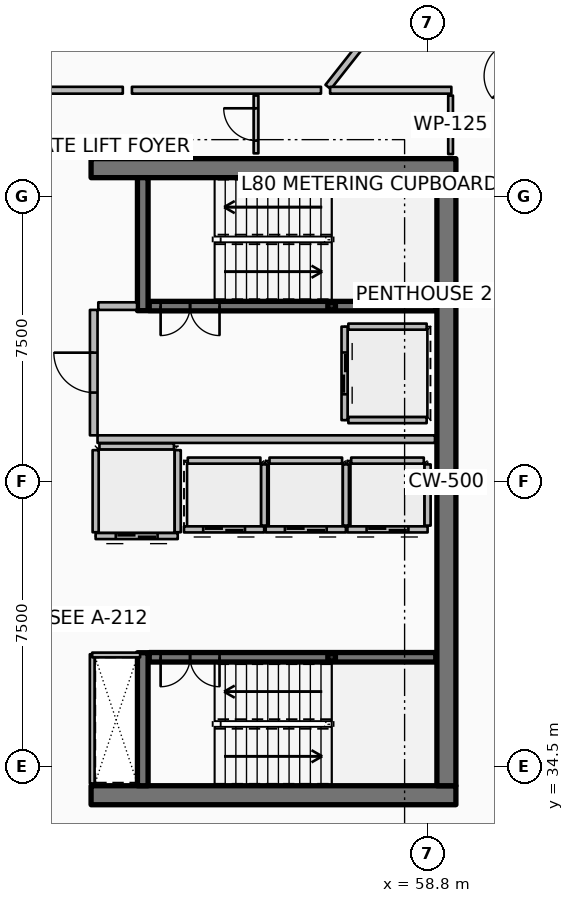
"""IFC4 building model, lengths in metres.
Left out: names, types, materials, properties, quantities, classifications, styles, units other than length and angle.
Written with IfcOpenShell. Run it as: python <this file> out.ifc"""

import sys

from ifc_helpers import new_model, si_unit, direction, frame, frame_2d, origin, origin_2d, place, context, subcontext, project, spatial, rectangle, hollow_rectangle, extrude, element, fill, save


model = new_model("IFC4")
c1 = context("Model", 3, precision=1e-05, world=origin(), true_north=direction((0.0, 1.0)))
c2 = subcontext(c1, "Body", "Model", "MODEL_VIEW")
j1 = project(units=[si_unit("LENGTHUNIT", "METRE"), si_unit("PLANEANGLEUNIT", "RADIAN")], contexts=[c1])
p1 = place(None, origin())
s1 = spatial("IfcSite", under=j1, at=p1, CompositionType="ELEMENT")
p2 = place(p1, origin())
s2 = spatial("IfcBuilding", under=s1, at=p2, CompositionType="ELEMENT")
p3 = place(p2, frame((0.0, 0.0, 317.9)))
s3 = spatial("IfcBuildingStorey", under=s2, at=p3, CompositionType="ELEMENT", Elevation=317.9)
for number, where, z_axis, x_axis in (
    (1, (49.95, 33.75, 0.0), (0.0, 0.0, 1.0), (1.0, 0.0, 0.0)),
    (2, (49.95, 50.25, 0.0), (0.0, 0.0, 1.0), (1.0, 0.0, 0.0)),
):
    element("IfcWall", number, at=place(p3, frame(where, z_axis=z_axis, x_axis=x_axis)), inside=s3, PredefinedType="SHEAR", context=c2, shape_type="SweptSolid", body=[
        extrude(rectangle(XDim=9.6, YDim=0.5, at=frame_2d((4.8, 0.0))), origin(), (0.0, 0.0, 1.0), 4.2),
    ])
p4 = place(p3, frame((59.3, 34.0, 0.0), z_axis=(0.0, 0.0, 1.0), x_axis=(0.0, 1.0, 0.0)))
e3 = element("IfcWall", 3, at=p4, inside=s3, PredefinedType="SHEAR", context=c2, shape_type="SweptSolid", body=[
    extrude(rectangle(XDim=16.0, YDim=0.5, at=frame_2d((8.0, 0.0))), origin(), (0.0, 0.0, 1.0), 4.2),
])
for number, where, z_axis, x_axis in (
    (4, (51.31, 46.5, 0.0), (0.0, 0.0, 1.0), (0.0, 1.0, 0.0)),
    (5, (51.31, 34.0, 0.0), (0.0, 0.0, 1.0), (0.0, 1.0, 0.0)),
):
    element("IfcWall", number, at=place(p3, frame(where, z_axis=z_axis, x_axis=x_axis)), inside=s3, PredefinedType="SHEAR", context=c2, shape_type="SweptSolid", body=[
        extrude(rectangle(XDim=3.5, YDim=0.28, at=frame_2d((1.75, 0.0))), origin(), (0.0, 0.0, 1.0), 4.2),
    ])
for number, where, z_axis, x_axis in (
    (6, (56.28, 46.62, 0.0), (0.0, 0.0, 1.0), (1.0, 0.0, 0.0)),
    (7, (56.28, 37.38, 0.0), (0.0, 0.0, 1.0), (1.0, 0.0, 0.0)),
):
    element("IfcColumn", number, at=place(p3, frame(where, z_axis=z_axis, x_axis=x_axis)), inside=s3, PredefinedType="COLUMN", context=c2, shape_type="SweptSolid", body=[
        extrude(hollow_rectangle(XDim=0.2, YDim=0.2, WallThickness=0.01, InnerFilletRadius=0.01, OuterFilletRadius=0.02, at=origin_2d()), origin(), (0.0, 0.0, 1.0), 1.895),
    ])
p5 = place(p3, frame((51.48, 46.62, 0.0), z_axis=(0.0, 0.0, 1.0), x_axis=(1.0, 0.0, 0.0)))
e8 = element("IfcWall", 8, at=p5, inside=s3, PredefinedType="SOLIDWALL", context=c2, shape_type="SweptSolid", body=[
    extrude(rectangle(XDim=7.54, YDim=0.25, at=frame_2d((3.77, 0.0))), origin(), (0.0, 0.0, 1.0), 3.94),
])
p6 = place(p5, frame((0.3, 0.0, 0.0)))
e9 = element("IfcOpeningElement", 9, at=p6, cuts=e8, PredefinedType="OPENING", context=c2, shape_type="SweptSolid", body=[
    extrude(rectangle(XDim=1.55, YDim=2.15, at=frame_2d((0.775, 1.075))), frame((0.0, 0.135, 0.0), z_axis=(0.0, -1.0, 0.0), x_axis=(1.0, 0.0, 0.0)), (0.0, 0.0, 1.0), 0.27),
])
p7 = place(p3, frame((51.48, 37.38, 0.0), z_axis=(0.0, 0.0, 1.0), x_axis=(1.0, 0.0, 0.0)))
e10 = element("IfcWall", 10, at=p7, inside=s3, PredefinedType="SOLIDWALL", context=c2, shape_type="SweptSolid", body=[
    extrude(rectangle(XDim=7.54, YDim=0.25, at=frame_2d((3.77, 0.0))), origin(), (0.0, 0.0, 1.0), 3.94),
])
p8 = place(p7, frame((0.3, 0.0, 0.0)))
e11 = element("IfcOpeningElement", 11, at=p8, cuts=e10, PredefinedType="OPENING", context=c2, shape_type="SweptSolid", body=[
    extrude(rectangle(XDim=1.55, YDim=2.15, at=frame_2d((0.775, 1.075))), frame((0.0, 0.135, 0.0), z_axis=(0.0, -1.0, 0.0), x_axis=(1.0, 0.0, 0.0)), (0.0, 0.0, 1.0), 0.27),
])
p9 = place(p3, frame((54.505, 40.745, 0.0), z_axis=(0.0, 0.0, 1.0), x_axis=(-1.0, 0.0, 0.0)))
e12 = element("IfcWall", 12, at=p9, inside=s3, PredefinedType="PARTITIONING", context=c2, shape_type="SweptSolid", body=[
    extrude(rectangle(XDim=2.11, YDim=0.16, at=frame_2d((1.055, 0.0))), origin(), (0.0, 0.0, 1.0), 3.94),
])
p10 = place(p9, frame((0.505, 0.0, 0.0)))
e13 = element("IfcOpeningElement", 13, at=p10, cuts=e12, PredefinedType="OPENING", context=c2, shape_type="SweptSolid", body=[
    extrude(rectangle(XDim=1.1, YDim=2.1, at=frame_2d((0.55, 1.05))), frame((0.0, 0.09, 0.0), z_axis=(0.0, -1.0, 0.0), x_axis=(1.0, 0.0, 0.0)), (0.0, 0.0, 1.0), 0.18),
])
p11 = place(p3, frame((54.505, 40.845, 0.0), z_axis=(0.0, 0.0, 1.0), x_axis=(0.0, 1.0, 0.0)))
e14 = element("IfcWall", 14, at=p11, inside=s3, PredefinedType="PARTITIONING", context=c2, shape_type="SweptSolid", body=[
    extrude(rectangle(XDim=1.61, YDim=0.16, at=frame_2d((0.805, 0.0))), origin(), (0.0, 0.0, 1.0), 3.94),
])
p12 = place(p3, frame((52.495, 42.555, 0.0), z_axis=(0.0, 0.0, 1.0), x_axis=(1.0, 0.0, 0.0)))
e15 = element("IfcWall", 15, at=p12, inside=s3, PredefinedType="PARTITIONING", context=c2, shape_type="SweptSolid", body=[
    extrude(rectangle(XDim=1.91, YDim=0.16, at=frame_2d((0.955, 0.0))), origin(), (0.0, 0.0, 1.0), 3.94),
])
p13 = place(p3, frame((56.655, 40.745, 0.0), z_axis=(0.0, 0.0, 1.0), x_axis=(-1.0, 0.0, 0.0)))
e16 = element("IfcWall", 16, at=p13, inside=s3, PredefinedType="PARTITIONING", context=c2, shape_type="SweptSolid", body=[
    extrude(rectangle(XDim=2.11, YDim=0.16, at=frame_2d((1.055, 0.0))), origin(), (0.0, 0.0, 1.0), 3.94),
])
p14 = place(p13, frame((0.505, 0.0, 0.0)))
e17 = element("IfcOpeningElement", 17, at=p14, cuts=e16, PredefinedType="OPENING", context=c2, shape_type="SweptSolid", body=[
    extrude(rectangle(XDim=1.1, YDim=2.1, at=frame_2d((0.55, 1.05))), frame((0.0, 0.09, 0.0), z_axis=(0.0, -1.0, 0.0), x_axis=(1.0, 0.0, 0.0)), (0.0, 0.0, 1.0), 0.18),
])
p15 = place(p3, frame((56.655, 40.845, 0.0), z_axis=(0.0, 0.0, 1.0), x_axis=(0.0, 1.0, 0.0)))
e18 = element("IfcWall", 18, at=p15, inside=s3, PredefinedType="PARTITIONING", context=c2, shape_type="SweptSolid", body=[
    extrude(rectangle(XDim=1.61, YDim=0.16, at=frame_2d((0.805, 0.0))), origin(), (0.0, 0.0, 1.0), 3.94),
])
p16 = place(p3, frame((54.645, 42.555, 0.0), z_axis=(0.0, 0.0, 1.0), x_axis=(1.0, 0.0, 0.0)))
e19 = element("IfcWall", 19, at=p16, inside=s3, PredefinedType="PARTITIONING", context=c2, shape_type="SweptSolid", body=[
    extrude(rectangle(XDim=1.91, YDim=0.16, at=frame_2d((0.955, 0.0))), origin(), (0.0, 0.0, 1.0), 3.94),
])
p17 = place(p3, frame((58.805, 40.745, 0.0), z_axis=(0.0, 0.0, 1.0), x_axis=(-1.0, 0.0, 0.0)))
e20 = element("IfcWall", 20, at=p17, inside=s3, PredefinedType="PARTITIONING", context=c2, shape_type="SweptSolid", body=[
    extrude(rectangle(XDim=2.11, YDim=0.16, at=frame_2d((1.055, 0.0))), origin(), (0.0, 0.0, 1.0), 3.94),
])
p18 = place(p17, frame((0.505, 0.0, 0.0)))
e21 = element("IfcOpeningElement", 21, at=p18, cuts=e20, PredefinedType="OPENING", context=c2, shape_type="SweptSolid", body=[
    extrude(rectangle(XDim=1.1, YDim=2.1, at=frame_2d((0.55, 1.05))), frame((0.0, 0.09, 0.0), z_axis=(0.0, -1.0, 0.0), x_axis=(1.0, 0.0, 0.0)), (0.0, 0.0, 1.0), 0.18),
])
p19 = place(p3, frame((58.805, 40.845, 0.0), z_axis=(0.0, 0.0, 1.0), x_axis=(0.0, 1.0, 0.0)))
e22 = element("IfcWall", 22, at=p19, inside=s3, PredefinedType="PARTITIONING", context=c2, shape_type="SweptSolid", body=[
    extrude(rectangle(XDim=1.61, YDim=0.16, at=frame_2d((0.805, 0.0))), origin(), (0.0, 0.0, 1.0), 3.94),
])
p20 = place(p3, frame((56.795, 42.555, 0.0), z_axis=(0.0, 0.0, 1.0), x_axis=(1.0, 0.0, 0.0)))
e23 = element("IfcWall", 23, at=p20, inside=s3, PredefinedType="PARTITIONING", context=c2, shape_type="SweptSolid", body=[
    extrude(rectangle(XDim=1.91, YDim=0.16, at=frame_2d((0.955, 0.0))), origin(), (0.0, 0.0, 1.0), 3.94),
])
p21 = place(p3, frame((56.62, 46.08, 0.0), z_axis=(0.0, 0.0, 1.0), x_axis=(0.0, -1.0, 0.0)))
e24 = element("IfcWall", 24, at=p21, inside=s3, PredefinedType="PARTITIONING", context=c2, shape_type="SweptSolid", body=[
    extrude(rectangle(XDim=2.46, YDim=0.16, at=frame_2d((1.23, 0.0))), origin(), (0.0, 0.0, 1.0), 3.94),
])
p22 = place(p21, frame((0.68, 0.0, 0.0)))
e25 = element("IfcOpeningElement", 25, at=p22, cuts=e24, PredefinedType="OPENING", context=c2, shape_type="SweptSolid", body=[
    extrude(rectangle(XDim=1.1, YDim=2.1, at=frame_2d((0.55, 1.05))), frame((0.0, 0.09, 0.0), z_axis=(0.0, -1.0, 0.0), x_axis=(1.0, 0.0, 0.0)), (0.0, 0.0, 1.0), 0.18),
])
for number, where, z_axis, x_axis in (
    (26, (56.72, 46.08, 0.0), (0.0, 0.0, 1.0), (1.0, 0.0, 0.0)),
    (27, (56.72, 43.62, 0.0), (0.0, 0.0, 1.0), (1.0, 0.0, 0.0)),
):
    element("IfcWall", number, at=place(p3, frame(where, z_axis=z_axis, x_axis=x_axis)), inside=s3, PredefinedType="PARTITIONING", context=c2, shape_type="SweptSolid", body=[
        extrude(rectangle(XDim=2.06, YDim=0.16, at=frame_2d((1.03, 0.0))), origin(), (0.0, 0.0, 1.0), 3.94),
    ])
p23 = place(p3, frame((52.23, 40.57, 0.0), z_axis=(0.0, 0.0, 1.0), x_axis=(-1.0, 0.0, 0.0)))
e28 = element("IfcWall", 28, at=p23, inside=s3, PredefinedType="PARTITIONING", context=c2, shape_type="SweptSolid", body=[
    extrude(rectangle(XDim=2.16, YDim=0.16, at=frame_2d((1.08, 0.0))), origin(), (0.0, 0.0, 1.0), 3.94),
])
p24 = place(p23, frame((0.53, 0.0, 0.0)))
e29 = element("IfcOpeningElement", 29, at=p24, cuts=e28, PredefinedType="OPENING", context=c2, shape_type="SweptSolid", body=[
    extrude(rectangle(XDim=1.1, YDim=2.1, at=frame_2d((0.55, 1.05))), frame((0.0, 0.09, 0.0), z_axis=(0.0, -1.0, 0.0), x_axis=(1.0, 0.0, 0.0)), (0.0, 0.0, 1.0), 0.18),
])
for number, where, z_axis, x_axis in (
    (30, (52.23, 40.67, 0.0), (0.0, 0.0, 1.0), (0.0, 1.0, 0.0)),
    (31, (50.07, 40.67, 0.0), (0.0, 0.0, 1.0), (0.0, 1.0, 0.0)),
):
    element("IfcWall", number, at=place(p3, frame(where, z_axis=z_axis, x_axis=x_axis)), inside=s3, PredefinedType="PARTITIONING", context=c2, shape_type="SweptSolid", body=[
        extrude(rectangle(XDim=2.16, YDim=0.16, at=frame_2d((1.08, 0.0))), origin(), (0.0, 0.0, 1.0), 3.94),
    ])
p25 = place(p3, frame((50.17, 42.93, 0.0), z_axis=(0.0, 0.0, 1.0), x_axis=(1.0, 0.0, 0.0)))
e32 = element("IfcWall", 32, at=p25, inside=s3, PredefinedType="PARTITIONING", context=c2, shape_type="SweptSolid", body=[
    extrude(rectangle(XDim=1.96, YDim=0.16, at=frame_2d((0.98, 0.0))), origin(), (0.0, 0.0, 1.0), 3.94),
])
p26 = place(p3, frame((50.12, 43.12, 0.0), z_axis=(0.0, 0.0, 1.0), x_axis=(1.0, 0.0, 0.0)))
e33 = element("IfcWall", 33, at=p26, inside=s3, PredefinedType="PARTITIONING", context=c2, shape_type="SweptSolid", body=[
    extrude(rectangle(XDim=8.88, YDim=0.2, at=frame_2d((4.44, 0.0))), origin(), (0.0, 0.0, 1.0), 3.94),
])
p27 = place(p3, frame((50.14, 46.62, 0.0), z_axis=(0.0, 0.0, 1.0), x_axis=(1.0, 0.0, 0.0)))
e34 = element("IfcWall", 34, at=p27, inside=s3, PredefinedType="PARTITIONING", context=c2, shape_type="SweptSolid", body=[
    extrude(rectangle(XDim=1.02, YDim=0.2, at=frame_2d((0.51, 0.0))), origin(), (0.0, 0.0, 1.0), 3.94),
])
p28 = place(p3, frame((50.02, 43.22, 0.0), z_axis=(0.0, 0.0, 1.0), x_axis=(0.0, 1.0, 0.0)))
e35 = element("IfcWall", 35, at=p28, inside=s3, PredefinedType="PARTITIONING", context=c2, shape_type="SweptSolid", body=[
    extrude(rectangle(XDim=3.3, YDim=0.2, at=frame_2d((1.65, 0.0))), origin(), (0.0, 0.0, 1.0), 3.94),
])
p29 = place(p28, frame((1.125, 0.0, 0.0)))
e36 = element("IfcOpeningElement", 36, at=p29, cuts=e35, PredefinedType="OPENING", context=c2, shape_type="SweptSolid", body=[
    extrude(rectangle(XDim=1.05, YDim=2.1, at=frame_2d((0.525, 1.05))), frame((0.0, 0.11, 0.0), z_axis=(0.0, -1.0, 0.0), x_axis=(1.0, 0.0, 0.0)), (0.0, 0.0, 1.0), 0.22),
])
p30 = place(p3, frame((49.98, 34.06, 0.0), z_axis=(0.0, 0.0, 1.0), x_axis=(0.0, 1.0, 0.0)))
e37 = element("IfcWall", 37, at=p30, inside=s3, PredefinedType="PARTITIONING", context=c2, shape_type="SweptSolid", body=[
    extrude(rectangle(XDim=3.4, YDim=0.125, at=frame_2d((1.7, 0.0))), origin(), (0.0, 0.0, 1.0), 3.38),
])
p31 = place(p3, frame((49.98, 37.44, 0.0), z_axis=(0.0, 0.0, 1.0), x_axis=(1.0, 0.0, 0.0)))
e38 = element("IfcWall", 38, at=p31, inside=s3, PredefinedType="PARTITIONING", context=c2, shape_type="SweptSolid", body=[
    extrude(rectangle(XDim=1.26, YDim=0.125, at=frame_2d((0.63, 0.0))), origin(), (0.0, 0.0, 1.0), 3.38),
])
p32 = place(p3, frame((59.41, 50.62, 0.0), z_axis=(0.0, 0.0, 1.0), x_axis=(0.0, 1.0, 0.0)))
e39 = element("IfcWall", 39, at=p32, inside=s3, PredefinedType="PARTITIONING", context=c2, shape_type="SweptSolid", body=[
    extrude(rectangle(XDim=1.54, YDim=0.125, at=frame_2d((0.77, 0.0))), origin(), (0.0, 0.0, 1.0), 3.38),
])
p33 = place(p3, frame((54.29, 50.64, 0.0), z_axis=(0.0, 0.0, 1.0), x_axis=(0.0, 1.0, 0.0)))
e40 = element("IfcWall", 40, at=p33, inside=s3, PredefinedType="PARTITIONING", context=c2, shape_type="SweptSolid", body=[
    extrude(rectangle(XDim=1.52, YDim=0.125, at=frame_2d((0.76, 0.0))), origin(), (0.0, 0.0, 1.0), 3.38),
])
p34 = place(p33, frame((0.335, 0.0, 0.0)))
e41 = element("IfcOpeningElement", 41, at=p34, cuts=e40, PredefinedType="OPENING", context=c2, shape_type="SweptSolid", body=[
    extrude(rectangle(XDim=0.85, YDim=2.06, at=frame_2d((0.425, 1.03))), frame((0.0, 0.073, 0.0), z_axis=(0.0, -1.0, 0.0), x_axis=(1.0, 0.0, 0.0)), (0.0, 0.0, 1.0), 0.145),
])
p35 = place(p3, frame((56.188, 52.386, 0.0), z_axis=(0.0, 0.0, 1.0), x_axis=(0.619092742501, 0.78531788225, 0.0)))
e42 = element("IfcWall", 42, at=p35, inside=s3, PredefinedType="PARTITIONING", context=c2, shape_type="SweptSolid", body=[
    extrude(rectangle(XDim=11.901, YDim=0.18, at=frame_2d((5.951, 0.0))), origin(), (0.0, 0.0, 1.0), 3.38),
])
p36 = place(p3, frame((56.0, 52.3, 0.0), z_axis=(0.0, 0.0, 1.0), x_axis=(-1.0, 0.0, 0.0)))
e43 = element("IfcWall", 43, at=p36, inside=s3, PredefinedType="PARTITIONING", context=c2, shape_type="SweptSolid", body=[
    extrude(rectangle(XDim=4.975, YDim=0.18, at=frame_2d((2.488, 0.0))), origin(), (0.0, 0.0, 1.0), 3.38),
])
p37 = place(p3, frame((50.785, 52.3, 0.0), z_axis=(0.0, 0.0, 1.0), x_axis=(-1.0, 0.0, 0.0)))
e44 = element("IfcWall", 44, at=p37, inside=s3, PredefinedType="PARTITIONING", context=c2, shape_type="SweptSolid", body=[
    extrude(rectangle(XDim=3.884, YDim=0.18, at=frame_2d((1.942, 0.0))), origin(), (0.0, 0.0, 1.0), 3.38),
])
p38 = place(p3, frame((59.43, 52.3, 0.0), z_axis=(0.0, 0.0, 1.0), x_axis=(-1.0, 0.0, 0.0)))
e45 = element("IfcWall", 45, at=p38, inside=s3, PredefinedType="PARTITIONING", context=c2, shape_type="SweptSolid", body=[
    extrude(rectangle(XDim=3.19, YDim=0.18, at=frame_2d((1.595, 0.0))), origin(), (0.0, 0.0, 1.0), 3.38),
])
p39 = place(p3, frame((63.019, 50.535, 0.0), z_axis=(0.0, 0.0, 1.0), x_axis=(-0.649450715324, 0.760403687764, 0.0)))
e46 = element("IfcWall", 46, at=p39, inside=s3, PredefinedType="PARTITIONING", context=c2, shape_type="SweptSolid", body=[
    extrude(rectangle(XDim=6.529, YDim=0.125, at=frame_2d((3.264, 0.0))), origin(), (0.0, 0.0, 1.0), 3.38),
])
p40 = place(p39, frame((2.814, 0.0, 0.0)))
e47 = element("IfcOpeningElement", 47, at=p40, cuts=e46, PredefinedType="OPENING", context=c2, shape_type="SweptSolid", body=[
    extrude(rectangle(XDim=0.9, YDim=2.08, at=frame_2d((0.45, 1.04))), frame((0.0, 0.073, 0.0), z_axis=(0.0, -1.0, 0.0), x_axis=(1.0, 0.0, 0.0)), (0.0, 0.0, 1.0), 0.145),
])
p41 = place(p3, frame((65.467, 51.906, 0.0), z_axis=(0.0, 0.0, 1.0), x_axis=(-0.649439942486, 0.760412888571, 0.0)))
e48 = element("IfcWall", 48, at=p41, inside=s3, PredefinedType="PARTITIONING", context=c2, shape_type="SweptSolid", body=[
    extrude(rectangle(XDim=7.623, YDim=0.125, at=frame_2d((3.812, 0.0))), origin(), (0.0, 0.0, 1.0), 3.38),
])
p42 = place(p41, frame((3.362, 0.0, 0.0)))
e49 = element("IfcOpeningElement", 49, at=p42, cuts=e48, PredefinedType="OPENING", context=c2, shape_type="SweptSolid", body=[
    extrude(rectangle(XDim=0.9, YDim=2.08, at=frame_2d((0.45, 1.04))), frame((0.0, 0.073, 0.0), z_axis=(0.0, -1.0, 0.0), x_axis=(1.0, 0.0, 0.0)), (0.0, 0.0, 1.0), 0.145),
])
p43 = place(p6, origin())
e50 = element("IfcDoor", 50, at=p43, inside=s3, OperationType="DOUBLE_DOOR_SINGLE_SWING", PredefinedType="DOOR", context=c2, shape_type="SweptSolid", body=[
    extrude(rectangle(XDim=1.55, YDim=2.15, at=frame_2d((0.775, 1.075))), frame((0.0, 0.025, 0.0), z_axis=(0.0, -1.0, 0.0), x_axis=(1.0, 0.0, 0.0)), (0.0, 0.0, 1.0), 0.05),
])
fill(e9, e50)
p44 = place(p8, origin())
e51 = element("IfcDoor", 51, at=p44, inside=s3, OperationType="DOUBLE_DOOR_SINGLE_SWING", PredefinedType="DOOR", context=c2, shape_type="SweptSolid", body=[
    extrude(rectangle(XDim=1.55, YDim=2.15, at=frame_2d((0.775, 1.075))), frame((0.0, 0.025, 0.0), z_axis=(0.0, -1.0, 0.0), x_axis=(1.0, 0.0, 0.0)), (0.0, 0.0, 1.0), 0.05),
])
fill(e11, e51)
p45 = place(p10, origin())
e52 = element("IfcDoor", 52, at=p45, inside=s3, OperationType="DOUBLE_DOOR_SLIDING", PredefinedType="DOOR", context=c2, shape_type="SweptSolid", body=[
    extrude(rectangle(XDim=1.1, YDim=2.1, at=frame_2d((0.55, 1.05))), frame((0.0, 0.025, 0.0), z_axis=(0.0, -1.0, 0.0), x_axis=(1.0, 0.0, 0.0)), (0.0, 0.0, 1.0), 0.05),
])
fill(e13, e52)
p46 = place(p14, origin())
e53 = element("IfcDoor", 53, at=p46, inside=s3, OperationType="DOUBLE_DOOR_SLIDING", PredefinedType="DOOR", context=c2, shape_type="SweptSolid", body=[
    extrude(rectangle(XDim=1.1, YDim=2.1, at=frame_2d((0.55, 1.05))), frame((0.0, 0.025, 0.0), z_axis=(0.0, -1.0, 0.0), x_axis=(1.0, 0.0, 0.0)), (0.0, 0.0, 1.0), 0.05),
])
fill(e17, e53)
p47 = place(p18, origin())
e54 = element("IfcDoor", 54, at=p47, inside=s3, OperationType="DOUBLE_DOOR_SLIDING", PredefinedType="DOOR", context=c2, shape_type="SweptSolid", body=[
    extrude(rectangle(XDim=1.1, YDim=2.1, at=frame_2d((0.55, 1.05))), frame((0.0, 0.025, 0.0), z_axis=(0.0, -1.0, 0.0), x_axis=(1.0, 0.0, 0.0)), (0.0, 0.0, 1.0), 0.05),
])
fill(e21, e54)
p48 = place(p22, origin())
e55 = element("IfcDoor", 55, at=p48, inside=s3, OperationType="DOUBLE_DOOR_SLIDING", PredefinedType="DOOR", context=c2, shape_type="SweptSolid", body=[
    extrude(rectangle(XDim=1.1, YDim=2.1, at=frame_2d((0.55, 1.05))), frame((0.0, 0.025, 0.0), z_axis=(0.0, -1.0, 0.0), x_axis=(1.0, 0.0, 0.0)), (0.0, 0.0, 1.0), 0.05),
])
fill(e25, e55)
p49 = place(p24, origin())
e56 = element("IfcDoor", 56, at=p49, inside=s3, OperationType="DOUBLE_DOOR_SLIDING", PredefinedType="DOOR", context=c2, shape_type="SweptSolid", body=[
    extrude(rectangle(XDim=1.1, YDim=2.1, at=frame_2d((0.55, 1.05))), frame((0.0, 0.025, 0.0), z_axis=(0.0, -1.0, 0.0), x_axis=(1.0, 0.0, 0.0)), (0.0, 0.0, 1.0), 0.05),
])
fill(e29, e56)
p50 = place(p29, origin())
e57 = element("IfcDoor", 57, at=p50, inside=s3, OperationType="SINGLE_SWING_RIGHT", PredefinedType="DOOR", context=c2, shape_type="SweptSolid", body=[
    extrude(rectangle(XDim=1.05, YDim=2.1, at=frame_2d((0.525, 1.05))), frame((0.0, 0.025, 0.0), z_axis=(0.0, -1.0, 0.0), x_axis=(1.0, 0.0, 0.0)), (0.0, 0.0, 1.0), 0.05),
])
fill(e36, e57)
p51 = place(p34, origin())
e58 = element("IfcDoor", 58, at=p51, inside=s3, OperationType="SINGLE_SWING_RIGHT", PredefinedType="DOOR", context=c2, shape_type="SweptSolid", body=[
    extrude(rectangle(XDim=0.85, YDim=2.06, at=frame_2d((0.425, 1.03))), frame((0.0, 0.025, 0.0), z_axis=(0.0, -1.0, 0.0), x_axis=(1.0, 0.0, 0.0)), (0.0, 0.0, 1.0), 0.05),
])
fill(e41, e58)
save(model, sys.argv[1])
